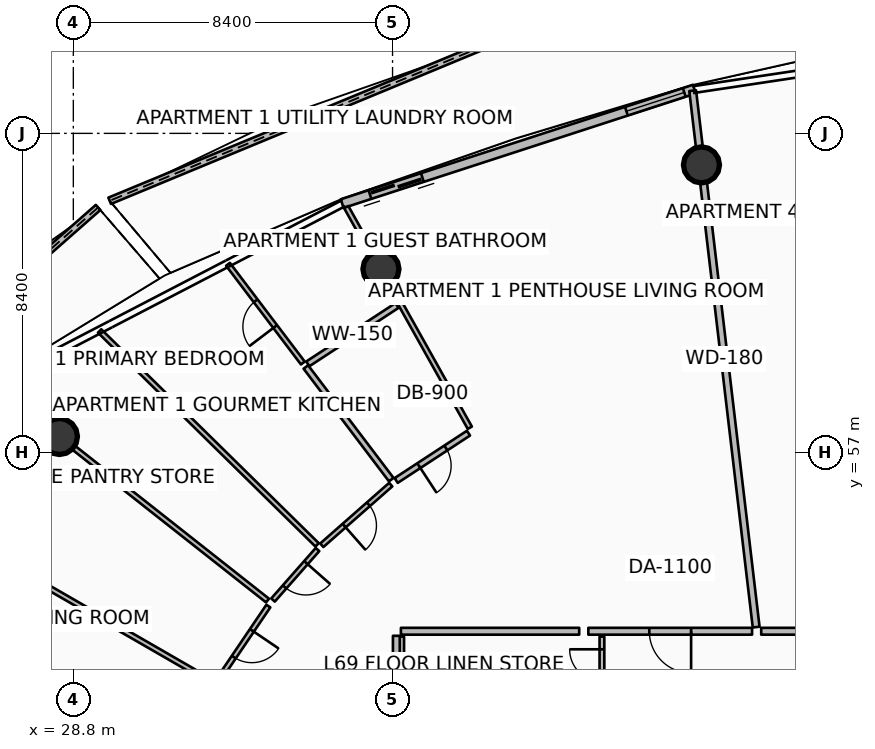
"""IFC4 building model, lengths in metres.
Left out: names, types, materials, properties, quantities, classifications, styles, units other than length and angle.
Written with IfcOpenShell. Run it as: python <this file> out.ifc"""

import sys

from ifc_helpers import new_model, si_unit, direction, frame, frame_2d, origin, origin_2d, place, context, subcontext, project, spatial, polyline, rectangle, circle, outline, extrude, element, fill, save


model = new_model("IFC4")
c1 = context("Model", 3, precision=1e-05, world=origin(), true_north=direction((0.0, 1.0)))
c2 = subcontext(c1, "Body", "Model", "MODEL_VIEW")
j1 = project(units=[si_unit("LENGTHUNIT", "METRE"), si_unit("PLANEANGLEUNIT", "RADIAN")], contexts=[c1])
p1 = place(None, origin())
s1 = spatial("IfcSite", under=j1, at=p1, CompositionType="ELEMENT")
p2 = place(p1, origin())
s2 = spatial("IfcBuilding", under=s1, at=p2, CompositionType="ELEMENT")
p3 = place(p2, frame((0.0, 0.0, 275.2)))
s3 = spatial("IfcBuildingStorey", under=s2, at=p3, CompositionType="ELEMENT", Elevation=275.2)
for number, where, z_axis, x_axis in (
    (1, (45.329, 64.571, 0.0), (0.0, 0.0, 1.0), (1.0, 0.0, 0.0)),
    (2, (36.895, 61.83, 0.0), (0.0, 0.0, 1.0), (1.0, 0.0, 0.0)),
    (3, (28.434, 57.425, 0.0), (0.0, 0.0, 1.0), (1.0, 0.0, 0.0)),
):
    element("IfcColumn", number, at=place(p3, frame(where, z_axis=z_axis, x_axis=x_axis)), inside=s3, PredefinedType="COLUMN", context=c2, shape_type="SweptSolid", body=[
        extrude(circle(Radius=0.475, at=origin_2d()), origin(), (0.0, 0.0, 1.0), 3.59),
    ])
p4 = place(p3, frame((39.532, 67.674, 0.0), z_axis=(0.0, 0.0, 1.0), x_axis=(-0.92394906856, -0.382515514336, 0.0)))
e4 = element("IfcWall", 4, at=p4, inside=s3, PredefinedType="PARAPET", context=c2, shape_type="SweptSolid", body=[
    extrude(outline(polyline([(0.0, 0.0), (10.58, 0.0), (10.58, 1.756), (5.29, 1.853), (0.0, 1.832), (0.0, 0.0)])), frame((0.0, 0.09, 0.0), z_axis=(0.0, -1.0, 0.0), x_axis=(1.0, 0.0, 0.0)), (0.0, 0.0, 1.0), 0.18),
])
p5 = place(p3, frame((29.452, 63.451, 0.0), z_axis=(0.0, 0.0, 1.0), x_axis=(-0.750904489888, -0.660410816891, 0.0)))
e5 = element("IfcWall", 5, at=p5, inside=s3, PredefinedType="PARAPET", context=c2, shape_type="SweptSolid", body=[
    extrude(outline(polyline([(0.0, 0.0), (11.385, 0.0), (11.385, 1.348), (5.692, 1.562), (0.0, 1.747), (0.0, 0.0)])), frame((0.0, 0.09, 0.0), z_axis=(0.0, -1.0, 0.0), x_axis=(1.0, 0.0, 0.0)), (0.0, 0.0, 1.0), 0.18),
])
p6 = place(p3, frame((45.142, 66.564, 0.0), z_axis=(0.0, 0.0, 1.0), x_axis=(-0.951055974609, -0.309018661507, 0.0)))
e6 = element("IfcWall", 6, at=p6, inside=s3, PredefinedType="SOLIDWALL", context=c2, shape_type="SweptSolid", body=[
    extrude(rectangle(XDim=9.745, YDim=0.24, at=frame_2d((4.873, 0.0))), origin(), (0.0, 0.0, 1.0), 2.54),
])
p7 = place(p6, frame((7.525, 0.0, 0.0)))
e7 = element("IfcOpeningElement", 7, at=p7, cuts=e6, PredefinedType="OPENING", context=c2, shape_type="SweptSolid", body=[
    extrude(rectangle(XDim=1.45, YDim=2.15, at=frame_2d((0.725, 1.075))), frame((0.0, 0.13, 0.0), z_axis=(0.0, -1.0, 0.0), x_axis=(1.0, 0.0, 0.0)), (0.0, 0.0, 1.0), 0.26),
])
p8 = place(p6, frame((0.28, 0.0, 0.65)))
e8 = element("IfcOpeningElement", 8, at=p8, cuts=e6, PredefinedType="OPENING", context=c2, shape_type="SweptSolid", body=[
    extrude(rectangle(XDim=1.6, YDim=1.5, at=frame_2d((0.8, 0.75))), frame((0.0, 0.13, 0.0), z_axis=(0.0, -1.0, 0.0), x_axis=(1.0, 0.0, 0.0)), (0.0, 0.0, 1.0), 0.26),
])
p9 = place(p3, frame((37.44, 50.62, 0.0), z_axis=(0.0, 0.0, 1.0), x_axis=(0.0, 1.0, 0.0)))
e9 = element("IfcWall", 9, at=p9, inside=s3, PredefinedType="PARTITIONING", context=c2, shape_type="SweptSolid", body=[
    extrude(rectangle(XDim=1.54, YDim=0.125, at=frame_2d((0.77, 0.0))), origin(), (0.0, 0.0, 1.0), 3.03),
])
p10 = place(p3, frame((42.71, 50.64, 0.0), z_axis=(0.0, 0.0, 1.0), x_axis=(0.0, 1.0, 0.0)))
e10 = element("IfcWall", 10, at=p10, inside=s3, PredefinedType="PARTITIONING", context=c2, shape_type="SweptSolid", body=[
    extrude(rectangle(XDim=1.52, YDim=0.125, at=frame_2d((0.76, 0.0))), origin(), (0.0, 0.0, 1.0), 2.957),
])
p11 = place(p10, frame((0.335, 0.0, 0.0)))
e11 = element("IfcOpeningElement", 11, at=p11, cuts=e10, PredefinedType="OPENING", context=c2, shape_type="SweptSolid", body=[
    extrude(rectangle(XDim=0.85, YDim=2.06, at=frame_2d((0.425, 1.03))), frame((0.0, 0.073, 0.0), z_axis=(0.0, -1.0, 0.0), x_axis=(1.0, 0.0, 0.0)), (0.0, 0.0, 1.0), 0.145),
])
p12 = place(p3, frame((46.768, 52.409, 0.0), z_axis=(0.0, 0.0, 1.0), x_axis=(-0.117545848714, 0.993067456646, 0.0)))
e12 = element("IfcWall", 12, at=p12, inside=s3, PredefinedType="PARTITIONING", context=c2, shape_type="SweptSolid", body=[
    extrude(rectangle(XDim=14.213, YDim=0.18, at=frame_2d((7.106, 0.0))), origin(), (0.0, 0.0, 1.0), 2.957),
])
p13 = place(p3, frame((46.661, 52.3, 0.0), z_axis=(0.0, 0.0, 1.0), x_axis=(-1.0, 0.0, 0.0)))
e13 = element("IfcWall", 13, at=p13, inside=s3, PredefinedType="PARTITIONING", context=c2, shape_type="SweptSolid", body=[
    extrude(rectangle(XDim=4.309, YDim=0.18, at=frame_2d((2.155, 0.0))), origin(), (0.0, 0.0, 1.0), 2.957),
])
p14 = place(p13, frame((1.604, 0.0, 0.0)))
e14 = element("IfcOpeningElement", 14, at=p14, cuts=e13, PredefinedType="OPENING", context=c2, shape_type="SweptSolid", body=[
    extrude(rectangle(XDim=1.1, YDim=2.1, at=frame_2d((0.55, 1.05))), frame((0.0, 0.1, 0.0), z_axis=(0.0, -1.0, 0.0), x_axis=(1.0, 0.0, 0.0)), (0.0, 0.0, 1.0), 0.2),
])
p15 = place(p3, frame((42.112, 52.3, 0.0), z_axis=(0.0, 0.0, 1.0), x_axis=(-1.0, 0.0, 0.0)))
e15 = element("IfcWall", 15, at=p15, inside=s3, PredefinedType="PARTITIONING", context=c2, shape_type="SweptSolid", body=[
    extrude(rectangle(XDim=4.692, YDim=0.18, at=frame_2d((2.346, 0.0))), origin(), (0.0, 0.0, 1.0), 2.957),
])
p16 = place(p3, frame((37.3, 52.18, 0.0), z_axis=(0.0, 0.0, 1.0), x_axis=(0.0, -1.0, 0.0)))
e16 = element("IfcWall", 16, at=p16, inside=s3, PredefinedType="PARTITIONING", context=c2, shape_type="SweptSolid", body=[
    extrude(rectangle(XDim=1.625, YDim=0.18, at=frame_2d((0.812, 0.0))), origin(), (0.0, 0.0, 1.0), 2.957),
])
p17 = place(p3, frame((39.233, 57.654, 0.0), z_axis=(0.0, 0.0, 1.0), x_axis=(-0.488631305502, 0.872490370883, 0.0)))
e17 = element("IfcWall", 17, at=p17, inside=s3, PredefinedType="PARTITIONING", context=c2, shape_type="SweptSolid", body=[
    extrude(rectangle(XDim=6.653, YDim=0.125, at=frame_2d((3.326, 0.0))), origin(), (0.0, 0.0, 1.0), 2.957),
])
p18 = place(p3, frame((39.198, 57.512, 0.0), z_axis=(0.0, 0.0, 1.0), x_axis=(-0.836678262568, -0.547694700491, 0.0)))
e18 = element("IfcWall", 18, at=p18, inside=s3, PredefinedType="PARTITIONING", context=c2, shape_type="SweptSolid", body=[
    extrude(rectangle(XDim=2.274, YDim=0.15, at=frame_2d((1.137, 0.0))), origin(), (0.0, 0.0, 1.0), 2.957),
])
p19 = place(p18, frame((0.712, 0.0, 0.0)))
e19 = element("IfcOpeningElement", 19, at=p19, cuts=e18, PredefinedType="OPENING", context=c2, shape_type="SweptSolid", body=[
    extrude(rectangle(XDim=0.85, YDim=2.06, at=frame_2d((0.425, 1.03))), frame((0.0, 0.085, 0.0), z_axis=(0.0, -1.0, 0.0), x_axis=(1.0, 0.0, 0.0)), (0.0, 0.0, 1.0), 0.17),
])
p20 = place(p3, frame((37.317, 60.871, 0.0), z_axis=(0.0, 0.0, 1.0), x_axis=(-0.836665995214, -0.547713440087, 0.0)))
e20 = element("IfcWall", 20, at=p20, inside=s3, PredefinedType="PARTITIONING", context=c2, shape_type="SweptSolid", body=[
    extrude(rectangle(XDim=2.806, YDim=0.15, at=frame_2d((1.403, 0.0))), origin(), (0.0, 0.0, 1.0), 2.957),
])
p21 = place(p3, frame((37.166, 56.289, 0.0), z_axis=(0.0, 0.0, 1.0), x_axis=(-0.604171001441, 0.796854692537, 0.0)))
e21 = element("IfcWall", 21, at=p21, inside=s3, PredefinedType="PARTITIONING", context=c2, shape_type="SweptSolid", body=[
    extrude(rectangle(XDim=3.72, YDim=0.15, at=frame_2d((1.86, 0.0))), origin(), (0.0, 0.0, 1.0), 3.03),
])
p22 = place(p3, frame((34.84, 59.357, 0.0), z_axis=(0.0, 0.0, 1.0), x_axis=(-0.604173390314, 0.7968528813, 0.0)))
e22 = element("IfcWall", 22, at=p22, inside=s3, PredefinedType="PARTITIONING", context=c2, shape_type="SweptSolid", body=[
    extrude(rectangle(XDim=3.26, YDim=0.125, at=frame_2d((1.63, 0.0))), origin(), (0.0, 0.0, 1.0), 3.03),
])
p23 = place(p22, frame((1.205, 0.0, 0.0)))
e23 = element("IfcOpeningElement", 23, at=p23, cuts=e22, PredefinedType="OPENING", context=c2, shape_type="SweptSolid", body=[
    extrude(rectangle(XDim=0.85, YDim=2.06, at=frame_2d((0.425, 1.03))), frame((0.0, 0.073, 0.0), z_axis=(0.0, -1.0, 0.0), x_axis=(1.0, 0.0, 0.0)), (0.0, 0.0, 1.0), 0.145),
])
p24 = place(p3, frame((35.214, 54.573, 0.0), z_axis=(0.0, 0.0, 1.0), x_axis=(-0.712998082221, 0.701165982311, 0.0)))
e24 = element("IfcWall", 24, at=p24, inside=s3, PredefinedType="PARTITIONING", context=c2, shape_type="SweptSolid", body=[
    extrude(rectangle(XDim=8.027, YDim=0.125, at=frame_2d((4.013, 0.0))), origin(), (0.0, 0.0, 1.0), 3.03),
])
p25 = place(p3, frame((37.153, 56.158, 0.0), z_axis=(0.0, 0.0, 1.0), x_axis=(-0.750978090344, -0.660327121829, 0.0)))
e25 = element("IfcWall", 25, at=p25, inside=s3, PredefinedType="PARTITIONING", context=c2, shape_type="SweptSolid", body=[
    extrude(rectangle(XDim=2.416, YDim=0.125, at=frame_2d((1.208, 0.0))), origin(), (0.0, 0.0, 1.0), 3.03),
])
p26 = place(p25, frame((0.783, 0.0, 0.0)))
e26 = element("IfcOpeningElement", 26, at=p26, cuts=e25, PredefinedType="OPENING", context=c2, shape_type="SweptSolid", body=[
    extrude(rectangle(XDim=0.85, YDim=2.06, at=frame_2d((0.425, 1.03))), frame((0.0, 0.073, 0.0), z_axis=(0.0, -1.0, 0.0), x_axis=(1.0, 0.0, 0.0)), (0.0, 0.0, 1.0), 0.145),
])
p27 = place(p3, frame((35.226, 54.45, 0.0), z_axis=(0.0, 0.0, 1.0), x_axis=(-0.661115526194, -0.7502841202, 0.0)))
e27 = element("IfcWall", 27, at=p27, inside=s3, PredefinedType="PARTITIONING", context=c2, shape_type="SweptSolid", body=[
    extrude(rectangle(XDim=1.771, YDim=0.125, at=frame_2d((0.886, 0.0))), origin(), (0.0, 0.0, 1.0), 2.957),
])
p28 = place(p27, frame((0.461, 0.0, 0.0)))
e28 = element("IfcOpeningElement", 28, at=p28, cuts=e27, PredefinedType="OPENING", context=c2, shape_type="SweptSolid", body=[
    extrude(rectangle(XDim=0.85, YDim=2.06, at=frame_2d((0.425, 1.03))), frame((0.0, 0.073, 0.0), z_axis=(0.0, -1.0, 0.0), x_axis=(1.0, 0.0, 0.0)), (0.0, 0.0, 1.0), 0.145),
])
p29 = place(p3, frame((33.91, 53.108, 0.0), z_axis=(0.0, 0.0, 1.0), x_axis=(-0.785332331122, 0.619074413697, 0.0)))
e29 = element("IfcWall", 29, at=p29, inside=s3, PredefinedType="PARTITIONING", context=c2, shape_type="SweptSolid", body=[
    extrude(rectangle(XDim=9.143, YDim=0.125, at=frame_2d((4.571, 0.0))), origin(), (0.0, 0.0, 1.0), 2.957),
])
p30 = place(p3, frame((32.466, 50.958, 0.0), z_axis=(0.0, 0.0, 1.0), x_axis=(-0.86629721787, 0.499528908383, 0.0)))
e30 = element("IfcWall", 30, at=p30, inside=s3, PredefinedType="PARTITIONING", context=c2, shape_type="SweptSolid", body=[
    extrude(rectangle(XDim=9.428, YDim=0.125, at=frame_2d((4.714, 0.0))), origin(), (0.0, 0.0, 1.0), 3.03),
])
p31 = place(p3, frame((33.932, 52.963, 0.0), z_axis=(0.0, 0.0, 1.0), x_axis=(-0.560751274748, -0.82798430412, 0.0)))
e31 = element("IfcWall", 31, at=p31, inside=s3, PredefinedType="PARTITIONING", context=c2, shape_type="SweptSolid", body=[
    extrude(rectangle(XDim=2.396, YDim=0.125, at=frame_2d((1.198, 0.0))), origin(), (0.0, 0.0, 1.0), 2.957),
])
p32 = place(p31, frame((0.773, 0.0, 0.0)))
e32 = element("IfcOpeningElement", 32, at=p32, cuts=e31, PredefinedType="OPENING", context=c2, shape_type="SweptSolid", body=[
    extrude(rectangle(XDim=0.85, YDim=2.06, at=frame_2d((0.425, 1.03))), frame((0.0, 0.073, 0.0), z_axis=(0.0, -1.0, 0.0), x_axis=(1.0, 0.0, 0.0)), (0.0, 0.0, 1.0), 0.145),
])
p33 = place(p3, frame((50.785, 52.3, 0.0), z_axis=(0.0, 0.0, 1.0), x_axis=(-1.0, 0.0, 0.0)))
e33 = element("IfcWall", 33, at=p33, inside=s3, PredefinedType="PARTITIONING", context=c2, shape_type="SweptSolid", body=[
    extrude(rectangle(XDim=3.884, YDim=0.18, at=frame_2d((1.942, 0.0))), origin(), (0.0, 0.0, 1.0), 2.957),
])
p34 = place(p33, frame((1.392, 0.0, 0.0)))
e34 = element("IfcOpeningElement", 34, at=p34, cuts=e33, PredefinedType="OPENING", context=c2, shape_type="SweptSolid", body=[
    extrude(rectangle(XDim=1.1, YDim=2.1, at=frame_2d((0.55, 1.05))), frame((0.0, 0.1, 0.0), z_axis=(0.0, -1.0, 0.0), x_axis=(1.0, 0.0, 0.0)), (0.0, 0.0, 1.0), 0.2),
])
p35 = place(p7, origin())
e35 = element("IfcDoor", 35, at=p35, inside=s3, OperationType="DOUBLE_DOOR_SLIDING", PredefinedType="DOOR", context=c2, shape_type="SweptSolid", body=[
    extrude(rectangle(XDim=1.45, YDim=2.15, at=frame_2d((0.725, 1.075))), frame((0.0, 0.025, 0.0), z_axis=(0.0, -1.0, 0.0), x_axis=(1.0, 0.0, 0.0)), (0.0, 0.0, 1.0), 0.05),
])
fill(e7, e35)
p36 = place(p8, origin())
e36 = element("IfcWindow", 36, at=p36, inside=s3, PartitioningType="SINGLE_PANEL", PredefinedType="WINDOW", context=c2, shape_type="SweptSolid", body=[
    extrude(rectangle(XDim=1.6, YDim=1.5, at=frame_2d((0.8, 0.75))), frame((0.0, 0.03, 0.0), z_axis=(0.0, -1.0, 0.0), x_axis=(1.0, 0.0, 0.0)), (0.0, 0.0, 1.0), 0.06),
])
fill(e8, e36)
p37 = place(p11, origin())
e37 = element("IfcDoor", 37, at=p37, inside=s3, OperationType="SINGLE_SWING_RIGHT", PredefinedType="DOOR", context=c2, shape_type="SweptSolid", body=[
    extrude(rectangle(XDim=0.85, YDim=2.06, at=frame_2d((0.425, 1.03))), frame((0.0, 0.025, 0.0), z_axis=(0.0, -1.0, 0.0), x_axis=(1.0, 0.0, 0.0)), (0.0, 0.0, 1.0), 0.05),
])
fill(e11, e37)
p38 = place(p14, origin())
e38 = element("IfcDoor", 38, at=p38, inside=s3, OperationType="SINGLE_SWING_LEFT", PredefinedType="DOOR", context=c2, shape_type="SweptSolid", body=[
    extrude(rectangle(XDim=1.1, YDim=2.1, at=frame_2d((0.55, 1.05))), frame((0.0, 0.025, 0.0), z_axis=(0.0, -1.0, 0.0), x_axis=(1.0, 0.0, 0.0)), (0.0, 0.0, 1.0), 0.05),
])
fill(e14, e38)
p39 = place(p19, origin())
e39 = element("IfcDoor", 39, at=p39, inside=s3, OperationType="SINGLE_SWING_RIGHT", PredefinedType="DOOR", context=c2, shape_type="SweptSolid", body=[
    extrude(rectangle(XDim=0.85, YDim=2.06, at=frame_2d((0.425, 1.03))), frame((0.0, 0.025, 0.0), z_axis=(0.0, -1.0, 0.0), x_axis=(1.0, 0.0, 0.0)), (0.0, 0.0, 1.0), 0.05),
])
fill(e19, e39)
p40 = place(p23, origin())
e40 = element("IfcDoor", 40, at=p40, inside=s3, OperationType="SINGLE_SWING_LEFT", PredefinedType="DOOR", context=c2, shape_type="SweptSolid", body=[
    extrude(rectangle(XDim=0.85, YDim=2.06, at=frame_2d((0.425, 1.03))), frame((0.0, 0.025, 0.0), z_axis=(0.0, -1.0, 0.0), x_axis=(1.0, 0.0, 0.0)), (0.0, 0.0, 1.0), 0.05),
])
fill(e23, e40)
p41 = place(p26, origin())
e41 = element("IfcDoor", 41, at=p41, inside=s3, OperationType="SINGLE_SWING_RIGHT", PredefinedType="DOOR", context=c2, shape_type="SweptSolid", body=[
    extrude(rectangle(XDim=0.85, YDim=2.06, at=frame_2d((0.425, 1.03))), frame((0.0, 0.025, 0.0), z_axis=(0.0, -1.0, 0.0), x_axis=(1.0, 0.0, 0.0)), (0.0, 0.0, 1.0), 0.05),
])
fill(e26, e41)
p42 = place(p28, origin())
e42 = element("IfcDoor", 42, at=p42, inside=s3, OperationType="SINGLE_SWING_LEFT", PredefinedType="DOOR", context=c2, shape_type="SweptSolid", body=[
    extrude(rectangle(XDim=0.85, YDim=2.06, at=frame_2d((0.425, 1.03))), frame((0.0, 0.025, 0.0), z_axis=(0.0, -1.0, 0.0), x_axis=(1.0, 0.0, 0.0)), (0.0, 0.0, 1.0), 0.05),
])
fill(e28, e42)
p43 = place(p32, origin())
e43 = element("IfcDoor", 43, at=p43, inside=s3, OperationType="SINGLE_SWING_LEFT", PredefinedType="DOOR", context=c2, shape_type="SweptSolid", body=[
    extrude(rectangle(XDim=0.85, YDim=2.06, at=frame_2d((0.425, 1.03))), frame((0.0, 0.025, 0.0), z_axis=(0.0, -1.0, 0.0), x_axis=(1.0, 0.0, 0.0)), (0.0, 0.0, 1.0), 0.05),
])
fill(e32, e43)
save(model, sys.argv[1])
